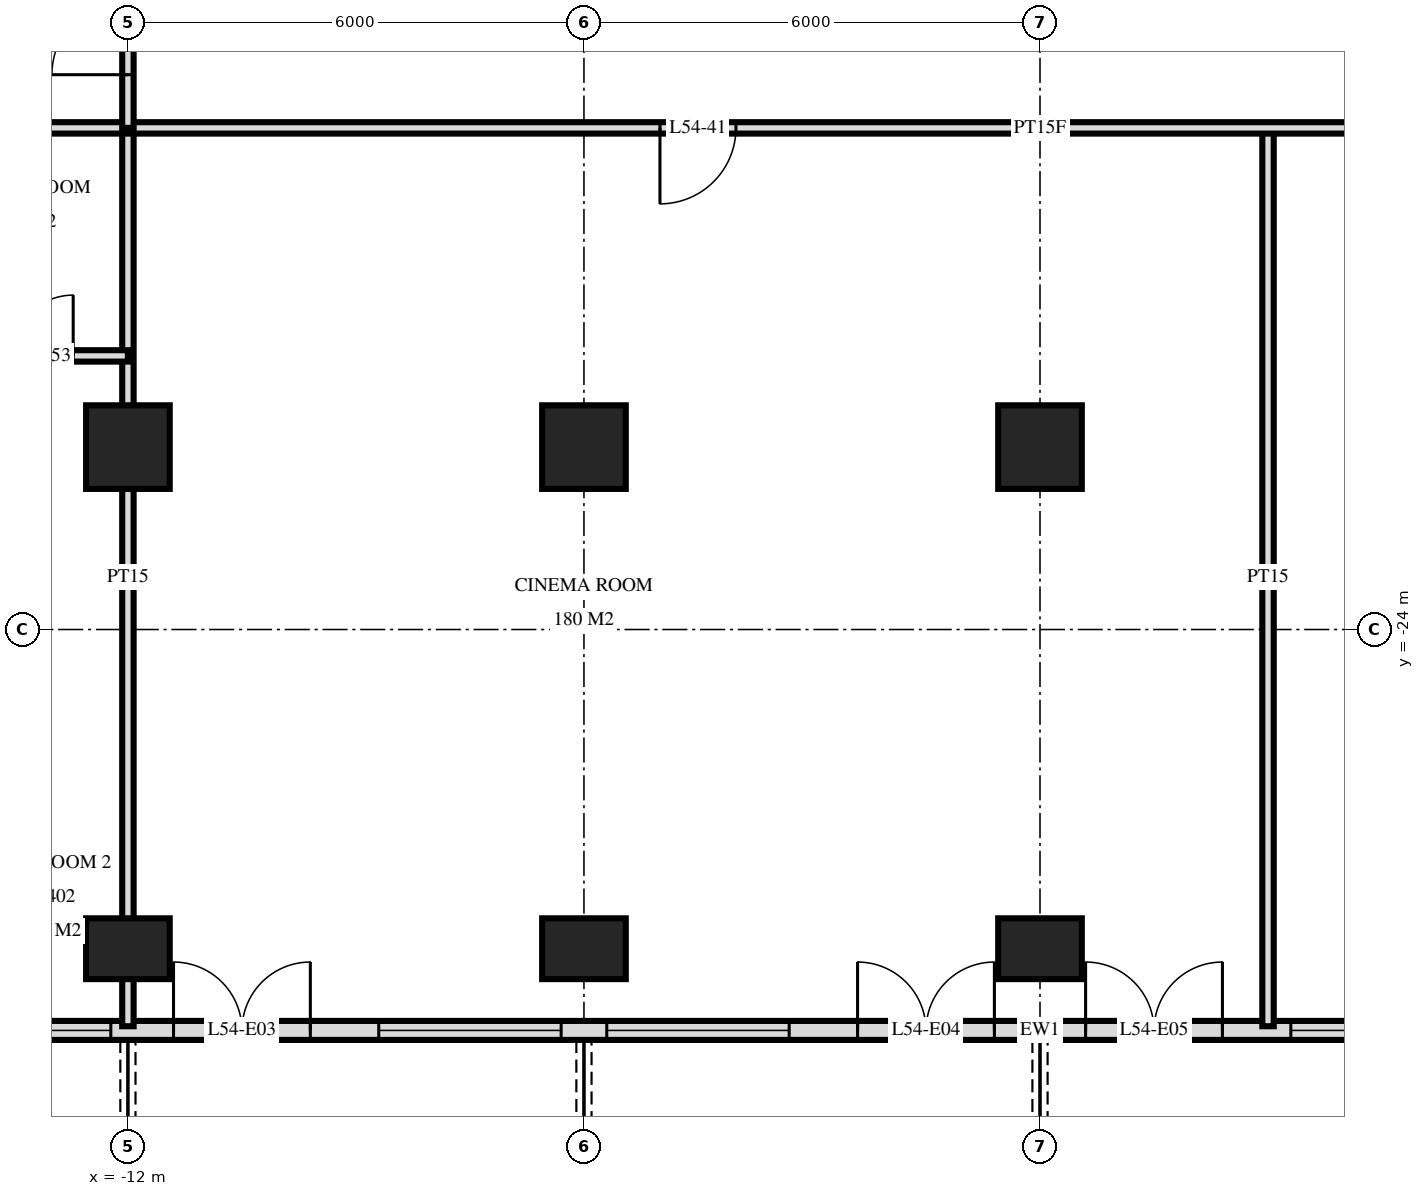
"""IFC4 building model, lengths in metres.
Left out: names, types, materials, properties, quantities, classifications, styles, units other than length and angle.
Written with IfcOpenShell. Run it as: python <this file> out.ifc"""

import sys

from ifc_helpers import new_model, si_unit, direction, frame, frame_2d, origin, origin_2d, place, context, subcontext, project, spatial, rectangle, extrude, element, fill, save


model = new_model("IFC4")
c1 = context("Model", 3, precision=1e-05, world=origin(), true_north=direction((0.0, 1.0)))
c2 = subcontext(c1, "Body", "Model", "MODEL_VIEW")
j1 = project(units=[si_unit("LENGTHUNIT", "METRE"), si_unit("PLANEANGLEUNIT", "RADIAN")], contexts=[c1])
p1 = place(None, origin())
s1 = spatial("IfcSite", under=j1, at=p1, CompositionType="ELEMENT")
p2 = place(p1, origin())
s2 = spatial("IfcBuilding", under=s1, at=p2, CompositionType="ELEMENT")
p3 = place(p2, frame((0.0, 0.0, 208.1)))
s3 = spatial("IfcBuildingStorey", under=s2, at=p3, CompositionType="ELEMENT", Elevation=208.1)
p4 = place(p3, frame((-12.0, -28.2, 0.0), z_axis=(0.0, 0.0, 1.0), x_axis=(1.0, 0.0, 0.0)))
e1 = element("IfcColumn", 1, at=p4, inside=s3, PredefinedType="COLUMN", context=c2, shape_type="SweptSolid", body=[
    extrude(rectangle(XDim=1.1, YDim=0.8, at=origin_2d()), origin(), (0.0, 0.0, 1.0), 3.5),
])
p5 = place(p3, frame((-12.0, -21.6, 0.0), z_axis=(0.0, 0.0, 1.0), x_axis=(1.0, 0.0, 0.0)))
e2 = element("IfcColumn", 2, at=p5, inside=s3, PredefinedType="COLUMN", context=c2, shape_type="SweptSolid", body=[
    extrude(rectangle(XDim=1.1, YDim=1.1, at=origin_2d()), origin(), (0.0, 0.0, 1.0), 3.5),
])
p6 = place(p3, frame((-6.0, -28.2, 0.0), z_axis=(0.0, 0.0, 1.0), x_axis=(1.0, 0.0, 0.0)))
e3 = element("IfcColumn", 3, at=p6, inside=s3, PredefinedType="COLUMN", context=c2, shape_type="SweptSolid", body=[
    extrude(rectangle(XDim=1.1, YDim=0.8, at=origin_2d()), origin(), (0.0, 0.0, 1.0), 3.5),
])
p7 = place(p3, frame((-6.0, -21.6, 0.0), z_axis=(0.0, 0.0, 1.0), x_axis=(1.0, 0.0, 0.0)))
e4 = element("IfcColumn", 4, at=p7, inside=s3, PredefinedType="COLUMN", context=c2, shape_type="SweptSolid", body=[
    extrude(rectangle(XDim=1.1, YDim=1.1, at=origin_2d()), origin(), (0.0, 0.0, 1.0), 3.5),
])
p8 = place(p3, frame((0.0, -28.2, 0.0), z_axis=(0.0, 0.0, 1.0), x_axis=(1.0, 0.0, 0.0)))
e5 = element("IfcColumn", 5, at=p8, inside=s3, PredefinedType="COLUMN", context=c2, shape_type="SweptSolid", body=[
    extrude(rectangle(XDim=1.1, YDim=0.8, at=origin_2d()), origin(), (0.0, 0.0, 1.0), 3.5),
])
p9 = place(p3, frame((0.0, -21.6, 0.0), z_axis=(0.0, 0.0, 1.0), x_axis=(1.0, 0.0, 0.0)))
e6 = element("IfcColumn", 6, at=p9, inside=s3, PredefinedType="COLUMN", context=c2, shape_type="SweptSolid", body=[
    extrude(rectangle(XDim=1.1, YDim=1.1, at=origin_2d()), origin(), (0.0, 0.0, 1.0), 3.5),
])
p10 = place(p3, frame((-22.475, -29.275, 0.0), z_axis=(0.0, 0.0, 1.0), x_axis=(1.0, 0.0, 0.0)))
e7 = element("IfcWall", 7, at=p10, inside=s3, PredefinedType="SOLIDWALL", context=c2, shape_type="SweptSolid", body=[
    extrude(rectangle(XDim=44.951, YDim=0.25, at=frame_2d((22.475, 0.0))), origin(), (0.0, 0.0, 1.0), 3.22),
])
p11 = place(p10, frame((0.575, 0.0, 0.0)))
e8 = element("IfcOpeningElement", 8, at=p11, cuts=e7, PredefinedType="OPENING", context=c2, shape_type="SweptSolid", body=[
    extrude(rectangle(XDim=1.8, YDim=2.4, at=frame_2d((0.9, 1.2))), frame((0.0, 0.135, 0.0), z_axis=(0.0, -1.0, 0.0), x_axis=(1.0, 0.0, 0.0)), (0.0, 0.0, 1.0), 0.27),
])
p12 = place(p10, frame((6.2, 0.0, 0.0)))
e9 = element("IfcOpeningElement", 9, at=p12, cuts=e7, PredefinedType="OPENING", context=c2, shape_type="SweptSolid", body=[
    extrude(rectangle(XDim=1.8, YDim=2.4, at=frame_2d((0.9, 1.2))), frame((0.0, 0.135, 0.0), z_axis=(0.0, -1.0, 0.0), x_axis=(1.0, 0.0, 0.0)), (0.0, 0.0, 1.0), 0.27),
])
p13 = place(p10, frame((8.45, 0.0, 0.9)))
e10 = element("IfcOpeningElement", 10, at=p13, cuts=e7, PredefinedType="OPENING", context=c2, shape_type="SweptSolid", body=[
    extrude(rectangle(XDim=1.8, YDim=1.5, at=frame_2d((0.9, 0.75))), frame((0.0, 0.135, 0.0), z_axis=(0.0, -1.0, 0.0), x_axis=(1.0, 0.0, 0.0)), (0.0, 0.0, 1.0), 0.27),
])
p14 = place(p10, frame((11.075, 0.0, 0.0)))
e11 = element("IfcOpeningElement", 11, at=p14, cuts=e7, PredefinedType="OPENING", context=c2, shape_type="SweptSolid", body=[
    extrude(rectangle(XDim=1.8, YDim=2.4, at=frame_2d((0.9, 1.2))), frame((0.0, 0.135, 0.0), z_axis=(0.0, -1.0, 0.0), x_axis=(1.0, 0.0, 0.0)), (0.0, 0.0, 1.0), 0.27),
])
p15 = place(p10, frame((13.775, 0.0, 0.9)))
e12 = element("IfcOpeningElement", 12, at=p15, cuts=e7, PredefinedType="OPENING", context=c2, shape_type="SweptSolid", body=[
    extrude(rectangle(XDim=2.4, YDim=1.5, at=frame_2d((1.2, 0.75))), frame((0.0, 0.135, 0.0), z_axis=(0.0, -1.0, 0.0), x_axis=(1.0, 0.0, 0.0)), (0.0, 0.0, 1.0), 0.27),
])
p16 = place(p10, frame((16.775, 0.0, 0.9)))
e13 = element("IfcOpeningElement", 13, at=p16, cuts=e7, PredefinedType="OPENING", context=c2, shape_type="SweptSolid", body=[
    extrude(rectangle(XDim=2.4, YDim=1.5, at=frame_2d((1.2, 0.75))), frame((0.0, 0.135, 0.0), z_axis=(0.0, -1.0, 0.0), x_axis=(1.0, 0.0, 0.0)), (0.0, 0.0, 1.0), 0.27),
])
p17 = place(p10, frame((20.075, 0.0, 0.0)))
e14 = element("IfcOpeningElement", 14, at=p17, cuts=e7, PredefinedType="OPENING", context=c2, shape_type="SweptSolid", body=[
    extrude(rectangle(XDim=1.8, YDim=2.4, at=frame_2d((0.9, 1.2))), frame((0.0, 0.135, 0.0), z_axis=(0.0, -1.0, 0.0), x_axis=(1.0, 0.0, 0.0)), (0.0, 0.0, 1.0), 0.27),
])
p18 = place(p10, frame((23.075, 0.0, 0.0)))
e15 = element("IfcOpeningElement", 15, at=p18, cuts=e7, PredefinedType="OPENING", context=c2, shape_type="SweptSolid", body=[
    extrude(rectangle(XDim=1.8, YDim=2.4, at=frame_2d((0.9, 1.2))), frame((0.0, 0.135, 0.0), z_axis=(0.0, -1.0, 0.0), x_axis=(1.0, 0.0, 0.0)), (0.0, 0.0, 1.0), 0.27),
])
p19 = place(p10, frame((25.775, 0.0, 0.9)))
e16 = element("IfcOpeningElement", 16, at=p19, cuts=e7, PredefinedType="OPENING", context=c2, shape_type="SweptSolid", body=[
    extrude(rectangle(XDim=2.4, YDim=1.5, at=frame_2d((1.2, 0.75))), frame((0.0, 0.135, 0.0), z_axis=(0.0, -1.0, 0.0), x_axis=(1.0, 0.0, 0.0)), (0.0, 0.0, 1.0), 0.27),
])
p20 = place(p10, frame((29.075, 0.0, 0.0)))
e17 = element("IfcOpeningElement", 17, at=p20, cuts=e7, PredefinedType="OPENING", context=c2, shape_type="SweptSolid", body=[
    extrude(rectangle(XDim=1.8, YDim=2.4, at=frame_2d((0.9, 1.2))), frame((0.0, 0.135, 0.0), z_axis=(0.0, -1.0, 0.0), x_axis=(1.0, 0.0, 0.0)), (0.0, 0.0, 1.0), 0.27),
])
p21 = place(p10, frame((31.775, 0.0, 0.9)))
e18 = element("IfcOpeningElement", 18, at=p21, cuts=e7, PredefinedType="OPENING", context=c2, shape_type="SweptSolid", body=[
    extrude(rectangle(XDim=2.4, YDim=1.5, at=frame_2d((1.2, 0.75))), frame((0.0, 0.135, 0.0), z_axis=(0.0, -1.0, 0.0), x_axis=(1.0, 0.0, 0.0)), (0.0, 0.0, 1.0), 0.27),
])
p22 = place(p10, frame((34.775, 0.0, 0.9)))
e19 = element("IfcOpeningElement", 19, at=p22, cuts=e7, PredefinedType="OPENING", context=c2, shape_type="SweptSolid", body=[
    extrude(rectangle(XDim=2.4, YDim=1.5, at=frame_2d((1.2, 0.75))), frame((0.0, 0.135, 0.0), z_axis=(0.0, -1.0, 0.0), x_axis=(1.0, 0.0, 0.0)), (0.0, 0.0, 1.0), 0.27),
])
p23 = place(p10, frame((38.075, 0.0, 0.0)))
e20 = element("IfcOpeningElement", 20, at=p23, cuts=e7, PredefinedType="OPENING", context=c2, shape_type="SweptSolid", body=[
    extrude(rectangle(XDim=1.8, YDim=2.4, at=frame_2d((0.9, 1.2))), frame((0.0, 0.135, 0.0), z_axis=(0.0, -1.0, 0.0), x_axis=(1.0, 0.0, 0.0)), (0.0, 0.0, 1.0), 0.27),
])
p24 = place(p10, frame((41.075, 0.0, 0.0)))
e21 = element("IfcOpeningElement", 21, at=p24, cuts=e7, PredefinedType="OPENING", context=c2, shape_type="SweptSolid", body=[
    extrude(rectangle(XDim=1.8, YDim=2.4, at=frame_2d((0.9, 1.2))), frame((0.0, 0.135, 0.0), z_axis=(0.0, -1.0, 0.0), x_axis=(1.0, 0.0, 0.0)), (0.0, 0.0, 1.0), 0.27),
])
p25 = place(p3, frame((3.0, -29.22, 0.0), z_axis=(0.0, 0.0, 1.0), x_axis=(0.0, 1.0, 0.0)))
e22 = element("IfcWall", 22, at=p25, inside=s3, PredefinedType="PARTITIONING", context=c2, shape_type="SweptSolid", body=[
    extrude(rectangle(XDim=11.82, YDim=0.15, at=frame_2d((5.91, 0.0))), origin(), (0.0, 0.0, 1.0), 3.22),
])
p26 = place(p3, frame((-12.0, -17.4, 0.0), z_axis=(0.0, 0.0, 1.0), x_axis=(0.0, 1.0, 0.0)))
e23 = element("IfcWall", 23, at=p26, inside=s3, PredefinedType="PARTITIONING", context=c2, shape_type="SweptSolid", body=[
    extrude(rectangle(XDim=2.35, YDim=0.15, at=frame_2d((1.175, 0.0))), origin(), (0.0, 0.0, 1.0), 3.22),
])
p27 = place(p26, frame((0.7, 0.0, 0.0)))
e24 = element("IfcOpeningElement", 24, at=p27, cuts=e23, PredefinedType="OPENING", context=c2, shape_type="SweptSolid", body=[
    extrude(rectangle(XDim=1.0, YDim=2.1, at=frame_2d((0.5, 1.05))), frame((0.0, 0.085, 0.0), z_axis=(0.0, -1.0, 0.0), x_axis=(1.0, 0.0, 0.0)), (0.0, 0.0, 1.0), 0.17),
])
p28 = place(p3, frame((-12.0, -29.22, 0.0), z_axis=(0.0, 0.0, 1.0), x_axis=(0.0, 1.0, 0.0)))
e25 = element("IfcWall", 25, at=p28, inside=s3, PredefinedType="PARTITIONING", context=c2, shape_type="SweptSolid", body=[
    extrude(rectangle(XDim=11.82, YDim=0.15, at=frame_2d((5.91, 0.0))), origin(), (0.0, 0.0, 1.0), 3.22),
])
p29 = place(p3, frame((-14.25, -20.4, 0.0), z_axis=(0.0, 0.0, 1.0), x_axis=(1.0, 0.0, 0.0)))
e26 = element("IfcWall", 26, at=p29, inside=s3, PredefinedType="PARTITIONING", context=c2, shape_type="SweptSolid", body=[
    extrude(rectangle(XDim=2.25, YDim=0.15, at=frame_2d((1.125, 0.0))), origin(), (0.0, 0.0, 1.0), 3.22),
])
p30 = place(p29, frame((0.73, 0.0, 0.0)))
e27 = element("IfcOpeningElement", 27, at=p30, cuts=e26, PredefinedType="OPENING", context=c2, shape_type="SweptSolid", body=[
    extrude(rectangle(XDim=0.8, YDim=2.1, at=frame_2d((0.4, 1.05))), frame((0.0, 0.085, 0.0), z_axis=(0.0, -1.0, 0.0), x_axis=(1.0, 0.0, 0.0)), (0.0, 0.0, 1.0), 0.17),
])
p31 = place(p3, frame((-26.82, -17.4, 0.0), z_axis=(0.0, 0.0, 1.0), x_axis=(1.0, 0.0, 0.0)))
e28 = element("IfcWall", 28, at=p31, inside=s3, PredefinedType="PARTITIONING", context=c2, shape_type="SweptSolid", body=[
    extrude(rectangle(XDim=53.64, YDim=0.15, at=frame_2d((26.82, 0.0))), origin(), (0.0, 0.0, 1.0), 3.22),
])
p32 = place(p31, frame((4.92, 0.0, 0.0)))
e29 = element("IfcOpeningElement", 29, at=p32, cuts=e28, PredefinedType="OPENING", context=c2, shape_type="SweptSolid", body=[
    extrude(rectangle(XDim=1.0, YDim=2.1, at=frame_2d((0.5, 1.05))), frame((0.0, 0.085, 0.0), z_axis=(0.0, -1.0, 0.0), x_axis=(1.0, 0.0, 0.0)), (0.0, 0.0, 1.0), 0.17),
])
p33 = place(p31, frame((1.62, 0.0, 0.0)))
e30 = element("IfcOpeningElement", 30, at=p33, cuts=e28, PredefinedType="OPENING", context=c2, shape_type="SweptSolid", body=[
    extrude(rectangle(XDim=1.0, YDim=2.1, at=frame_2d((0.5, 1.05))), frame((0.0, 0.085, 0.0), z_axis=(0.0, -1.0, 0.0), x_axis=(1.0, 0.0, 0.0)), (0.0, 0.0, 1.0), 0.17),
])
p34 = place(p31, frame((41.17, 0.0, 0.0)))
e31 = element("IfcOpeningElement", 31, at=p34, cuts=e28, PredefinedType="OPENING", context=c2, shape_type="SweptSolid", body=[
    extrude(rectangle(XDim=1.0, YDim=2.1, at=frame_2d((0.5, 1.05))), frame((0.0, 0.085, 0.0), z_axis=(0.0, -1.0, 0.0), x_axis=(1.0, 0.0, 0.0)), (0.0, 0.0, 1.0), 0.17),
])
p35 = place(p31, frame((49.42, 0.0, 0.0)))
e32 = element("IfcOpeningElement", 32, at=p35, cuts=e28, PredefinedType="OPENING", context=c2, shape_type="SweptSolid", body=[
    extrude(rectangle(XDim=1.0, YDim=2.1, at=frame_2d((0.5, 1.05))), frame((0.0, 0.085, 0.0), z_axis=(0.0, -1.0, 0.0), x_axis=(1.0, 0.0, 0.0)), (0.0, 0.0, 1.0), 0.17),
])
p36 = place(p31, frame((47.62, 0.0, 0.0)))
e33 = element("IfcOpeningElement", 33, at=p36, cuts=e28, PredefinedType="OPENING", context=c2, shape_type="SweptSolid", body=[
    extrude(rectangle(XDim=1.0, YDim=2.1, at=frame_2d((0.5, 1.05))), frame((0.0, 0.085, 0.0), z_axis=(0.0, -1.0, 0.0), x_axis=(1.0, 0.0, 0.0)), (0.0, 0.0, 1.0), 0.17),
])
p37 = place(p31, frame((21.82, 0.0, 0.0)))
e34 = element("IfcOpeningElement", 34, at=p37, cuts=e28, PredefinedType="OPENING", context=c2, shape_type="SweptSolid", body=[
    extrude(rectangle(XDim=1.0, YDim=2.1, at=frame_2d((0.5, 1.05))), frame((0.0, 0.085, 0.0), z_axis=(0.0, -1.0, 0.0), x_axis=(1.0, 0.0, 0.0)), (0.0, 0.0, 1.0), 0.17),
])
p38 = place(p31, frame((33.82, 0.0, 0.0)))
e35 = element("IfcOpeningElement", 35, at=p38, cuts=e28, PredefinedType="OPENING", context=c2, shape_type="SweptSolid", body=[
    extrude(rectangle(XDim=1.0, YDim=2.1, at=frame_2d((0.5, 1.05))), frame((0.0, 0.085, 0.0), z_axis=(0.0, -1.0, 0.0), x_axis=(1.0, 0.0, 0.0)), (0.0, 0.0, 1.0), 0.17),
])
p39 = place(p13, origin())
e36 = element("IfcWindow", 36, at=p39, inside=s3, PartitioningType="SINGLE_PANEL", PredefinedType="WINDOW", context=c2, shape_type="SweptSolid", body=[
    extrude(rectangle(XDim=1.8, YDim=1.5, at=frame_2d((0.9, 0.75))), frame((0.0, 0.03, 0.0), z_axis=(0.0, -1.0, 0.0), x_axis=(1.0, 0.0, 0.0)), (0.0, 0.0, 1.0), 0.06),
])
fill(e10, e36)
p40 = place(p14, origin())
e37 = element("IfcDoor", 37, at=p40, inside=s3, OperationType="DOUBLE_DOOR_SINGLE_SWING", PredefinedType="DOOR", context=c2, shape_type="SweptSolid", body=[
    extrude(rectangle(XDim=1.8, YDim=2.4, at=frame_2d((0.9, 1.2))), frame((0.0, 0.025, 0.0), z_axis=(0.0, -1.0, 0.0), x_axis=(1.0, 0.0, 0.0)), (0.0, 0.0, 1.0), 0.05),
])
fill(e11, e37)
p41 = place(p15, origin())
e38 = element("IfcWindow", 38, at=p41, inside=s3, PartitioningType="SINGLE_PANEL", PredefinedType="WINDOW", context=c2, shape_type="SweptSolid", body=[
    extrude(rectangle(XDim=2.4, YDim=1.5, at=frame_2d((1.2, 0.75))), frame((0.0, 0.03, 0.0), z_axis=(0.0, -1.0, 0.0), x_axis=(1.0, 0.0, 0.0)), (0.0, 0.0, 1.0), 0.06),
])
fill(e12, e38)
p42 = place(p16, origin())
e39 = element("IfcWindow", 39, at=p42, inside=s3, PartitioningType="SINGLE_PANEL", PredefinedType="WINDOW", context=c2, shape_type="SweptSolid", body=[
    extrude(rectangle(XDim=2.4, YDim=1.5, at=frame_2d((1.2, 0.75))), frame((0.0, 0.03, 0.0), z_axis=(0.0, -1.0, 0.0), x_axis=(1.0, 0.0, 0.0)), (0.0, 0.0, 1.0), 0.06),
])
fill(e13, e39)
p43 = place(p17, origin())
e40 = element("IfcDoor", 40, at=p43, inside=s3, OperationType="DOUBLE_DOOR_SINGLE_SWING", PredefinedType="DOOR", context=c2, shape_type="SweptSolid", body=[
    extrude(rectangle(XDim=1.8, YDim=2.4, at=frame_2d((0.9, 1.2))), frame((0.0, 0.025, 0.0), z_axis=(0.0, -1.0, 0.0), x_axis=(1.0, 0.0, 0.0)), (0.0, 0.0, 1.0), 0.05),
])
fill(e14, e40)
p44 = place(p18, origin())
e41 = element("IfcDoor", 41, at=p44, inside=s3, OperationType="DOUBLE_DOOR_SINGLE_SWING", PredefinedType="DOOR", context=c2, shape_type="SweptSolid", body=[
    extrude(rectangle(XDim=1.8, YDim=2.4, at=frame_2d((0.9, 1.2))), frame((0.0, 0.025, 0.0), z_axis=(0.0, -1.0, 0.0), x_axis=(1.0, 0.0, 0.0)), (0.0, 0.0, 1.0), 0.05),
])
fill(e15, e41)
p45 = place(p19, origin())
e42 = element("IfcWindow", 42, at=p45, inside=s3, PartitioningType="SINGLE_PANEL", PredefinedType="WINDOW", context=c2, shape_type="SweptSolid", body=[
    extrude(rectangle(XDim=2.4, YDim=1.5, at=frame_2d((1.2, 0.75))), frame((0.0, 0.03, 0.0), z_axis=(0.0, -1.0, 0.0), x_axis=(1.0, 0.0, 0.0)), (0.0, 0.0, 1.0), 0.06),
])
fill(e16, e42)
p46 = place(p27, origin())
e43 = element("IfcDoor", 43, at=p46, inside=s3, OperationType="SINGLE_SWING_RIGHT", PredefinedType="DOOR", context=c2, shape_type="SweptSolid", body=[
    extrude(rectangle(XDim=1.0, YDim=2.1, at=frame_2d((0.5, 1.05))), frame((0.0, 0.025, 0.0), z_axis=(0.0, -1.0, 0.0), x_axis=(1.0, 0.0, 0.0)), (0.0, 0.0, 1.0), 0.05),
])
fill(e24, e43)
p47 = place(p37, frame((0.5, 0.0, 0.0), z_axis=(0.0, 0.0, 1.0), x_axis=(-1.0, 0.0, 0.0)))
e44 = element("IfcDoor", 44, at=p47, inside=s3, OperationType="SINGLE_SWING_LEFT", PredefinedType="DOOR", context=c2, shape_type="SweptSolid", body=[
    extrude(rectangle(XDim=1.0, YDim=2.1, at=frame_2d((0.0, 1.05))), frame((0.0, -0.025, 0.0), z_axis=(0.0, 1.0, 0.0), x_axis=(-1.0, 0.0, 0.0)), (0.0, 0.0, 1.0), 0.05),
])
fill(e34, e44)
p48 = place(p30, origin())
e45 = element("IfcDoor", 45, at=p48, inside=s3, OperationType="SINGLE_SWING_LEFT", PredefinedType="DOOR", context=c2, shape_type="SweptSolid", body=[
    extrude(rectangle(XDim=0.8, YDim=2.1, at=frame_2d((0.4, 1.05))), frame((0.0, 0.025, 0.0), z_axis=(0.0, -1.0, 0.0), x_axis=(1.0, 0.0, 0.0)), (0.0, 0.0, 1.0), 0.05),
])
fill(e27, e45)
save(model, sys.argv[1])
